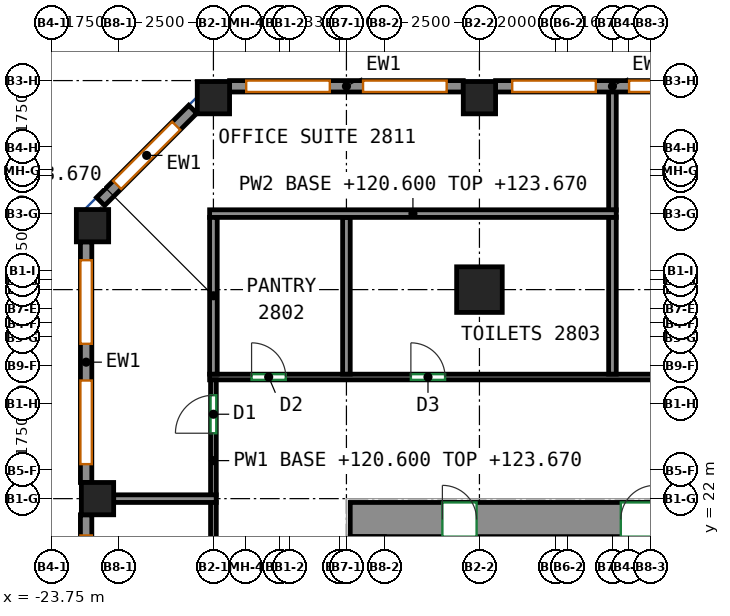
"""IFC4 building model, lengths in metres.
Left out: names, types, materials, properties, quantities, classifications, styles, units other than length and angle.
Written with IfcOpenShell. Run it as: python <this file> out.ifc"""

import sys

from ifc_helpers import new_model, si_unit, direction, frame, frame_2d, origin, origin_2d, place, context, subcontext, project, spatial, rectangle, extrude, source, transform, mapped, element, fill, save


model = new_model("IFC4")
c1 = context("Model", 3, precision=1e-05, world=origin(), true_north=direction((0.0, 1.0)))
c2 = subcontext(c1, "Body", "Model", "MODEL_VIEW")
j1 = project(units=[si_unit("LENGTHUNIT", "METRE"), si_unit("PLANEANGLEUNIT", "RADIAN")], contexts=[c1])
p1 = place(None, origin())
s1 = spatial("IfcSite", under=j1, at=p1, CompositionType="ELEMENT")
p2 = place(p1, origin())
s2 = spatial("IfcBuilding", under=s1, at=p2, CompositionType="ELEMENT")
p3 = place(p2, frame((0.0, 0.0, 120.6)))
s3 = spatial("IfcBuildingStorey", under=s2, at=p3, CompositionType="ELEMENT", Elevation=120.6)
m1 = source(origin(), c2, "Body", "SweptSolid", [
    extrude(rectangle(XDim=0.85, YDim=0.85, at=origin_2d()), origin(), (0.0, 0.0, 1.0), 3.72),
])
for number, where, z_axis, x_axis in (
    (1, (-22.682, 29.182, 0.0), (0.0, 0.0, 1.0), (1.0, 0.0, 0.0)),
    (2, (-22.55, 22.0, 0.0), (0.0, 0.0, 1.0), (1.0, 0.0, 0.0)),
    (3, (-19.5, 32.55, 0.0), (0.0, 0.0, 1.0), (1.0, 0.0, 0.0)),
):
    element("IfcColumn", number, at=place(p3, frame(where, z_axis=z_axis, x_axis=x_axis)), inside=s3, PredefinedType="COLUMN", context=c2, shape_type="MappedRepresentation", body=[
        mapped(m1, transform((0.0, 0.0, 0.0))),
    ])
m2 = source(origin(), c2, "Body", "SweptSolid", [
    extrude(rectangle(XDim=1.2, YDim=1.2, at=origin_2d()), origin(), (0.0, 0.0, 1.0), 3.72),
])
p4 = place(p3, frame((-12.5, 27.5, 0.0), z_axis=(0.0, 0.0, 1.0), x_axis=(1.0, 0.0, 0.0)))
e4 = element("IfcColumn", 4, at=p4, inside=s3, PredefinedType="COLUMN", context=c2, shape_type="MappedRepresentation", body=[
    mapped(m2, transform((0.0, 0.0, 0.0))),
])
p5 = place(p3, frame((-12.5, 32.55, 0.0), z_axis=(0.0, 0.0, 1.0), x_axis=(1.0, 0.0, 0.0)))
e5 = element("IfcColumn", 5, at=p5, inside=s3, PredefinedType="COLUMN", context=c2, shape_type="MappedRepresentation", body=[
    mapped(m1, transform((0.0, 0.0, 0.0))),
])
m3 = source(origin(), c2, "Body", "SweptSolid", [
    extrude(rectangle(XDim=33.9, YDim=0.9, at=frame_2d((16.95, 0.0))), origin(), (0.0, 0.0, 1.0), 3.72),
])
p6 = place(p3, frame((-15.9, 21.45, 0.0), z_axis=(0.0, 0.0, 1.0), x_axis=(1.0, 0.0, 0.0)))
e6 = element("IfcWall", 6, at=p6, inside=s3, PredefinedType="SHEAR", context=c2, shape_type="MappedRepresentation", body=[
    mapped(m3, transform((0.0, 0.0, 0.0))),
])
p7 = place(p6, frame((7.12, 0.0, 0.0)))
e7 = element("IfcOpeningElement", 7, at=p7, cuts=e6, PredefinedType="OPENING", context=c2, shape_type="SweptSolid", body=[
    extrude(rectangle(XDim=0.9, YDim=2.1, at=frame_2d((0.45, 1.05))), frame((0.0, 0.46, 0.0), z_axis=(0.0, -1.0, 0.0), x_axis=(1.0, 0.0, 0.0)), (0.0, 0.0, 1.0), 0.92),
])
p8 = place(p6, frame((12.427, 0.0, 0.0)))
e8 = element("IfcOpeningElement", 8, at=p8, cuts=e6, PredefinedType="OPENING", context=c2, shape_type="SweptSolid", body=[
    extrude(rectangle(XDim=0.9, YDim=2.1, at=frame_2d((0.45, 1.05))), frame((0.0, 0.46, 0.0), z_axis=(0.0, -1.0, 0.0), x_axis=(1.0, 0.0, 0.0)), (0.0, 0.0, 1.0), 0.92),
])
p9 = place(p6, frame((17.465, 0.0, 0.0)))
e9 = element("IfcOpeningElement", 9, at=p9, cuts=e6, PredefinedType="OPENING", context=c2, shape_type="SweptSolid", body=[
    extrude(rectangle(XDim=0.9, YDim=2.1, at=frame_2d((0.45, 1.05))), frame((0.0, 0.46, 0.0), z_axis=(0.0, -1.0, 0.0), x_axis=(1.0, 0.0, 0.0)), (0.0, 0.0, 1.0), 0.92),
])
p10 = place(p6, frame((21.686, 0.0, 0.0)))
e10 = element("IfcOpeningElement", 10, at=p10, cuts=e6, PredefinedType="OPENING", context=c2, shape_type="SweptSolid", body=[
    extrude(rectangle(XDim=0.9, YDim=2.1, at=frame_2d((0.45, 1.05))), frame((0.0, 0.46, 0.0), z_axis=(0.0, -1.0, 0.0), x_axis=(1.0, 0.0, 0.0)), (0.0, 0.0, 1.0), 0.92),
])
p11 = place(p6, frame((26.027, 0.0, 0.0)))
e11 = element("IfcOpeningElement", 11, at=p11, cuts=e6, PredefinedType="OPENING", context=c2, shape_type="SweptSolid", body=[
    extrude(rectangle(XDim=0.9, YDim=2.1, at=frame_2d((0.45, 1.05))), frame((0.0, 0.46, 0.0), z_axis=(0.0, -1.0, 0.0), x_axis=(1.0, 0.0, 0.0)), (0.0, 0.0, 1.0), 0.92),
])
p12 = place(p6, frame((2.425, 0.0, 0.0)))
e12 = element("IfcOpeningElement", 12, at=p12, cuts=e6, PredefinedType="OPENING", context=c2, shape_type="SweptSolid", body=[
    extrude(rectangle(XDim=0.9, YDim=2.1, at=frame_2d((0.45, 1.05))), frame((0.0, 0.46, 0.0), z_axis=(0.0, -1.0, 0.0), x_axis=(1.0, 0.0, 0.0)), (0.0, 0.0, 1.0), 0.92),
])
p13 = place(p6, frame((30.575, 0.0, 0.0)))
e13 = element("IfcOpeningElement", 13, at=p13, cuts=e6, PredefinedType="OPENING", context=c2, shape_type="SweptSolid", body=[
    extrude(rectangle(XDim=0.9, YDim=2.1, at=frame_2d((0.45, 1.05))), frame((0.0, 0.46, 0.0), z_axis=(0.0, -1.0, 0.0), x_axis=(1.0, 0.0, 0.0)), (0.0, 0.0, 1.0), 0.92),
])
m4 = source(origin(), c2, "Body", "SweptSolid", [
    extrude(rectangle(XDim=6.15, YDim=0.3, at=frame_2d((3.075, 0.0))), origin(), (0.0, 0.0, 1.0), 3.72),
])
p14 = place(p3, frame((-5.925, 32.85, 0.0), z_axis=(0.0, 0.0, 1.0), x_axis=(-1.0, 0.0, 0.0)))
e14 = element("IfcWall", 14, at=p14, inside=s3, PredefinedType="SOLIDWALL", context=c2, shape_type="MappedRepresentation", body=[
    mapped(m4, transform((0.0, 0.0, 0.0))),
])
p15 = place(p14, frame((0.438, 0.0, 0.7)))
e15 = element("IfcOpeningElement", 15, at=p15, cuts=e14, PredefinedType="OPENING", context=c2, shape_type="SweptSolid", body=[
    extrude(rectangle(XDim=2.2, YDim=2.25, at=frame_2d((1.1, 1.125))), frame((0.0, 0.16, 0.0), z_axis=(0.0, -1.0, 0.0), x_axis=(1.0, 0.0, 0.0)), (0.0, 0.0, 1.0), 0.32),
])
p16 = place(p14, frame((3.512, 0.0, 0.7)))
e16 = element("IfcOpeningElement", 16, at=p16, cuts=e14, PredefinedType="OPENING", context=c2, shape_type="SweptSolid", body=[
    extrude(rectangle(XDim=2.2, YDim=2.25, at=frame_2d((1.1, 1.125))), frame((0.0, 0.16, 0.0), z_axis=(0.0, -1.0, 0.0), x_axis=(1.0, 0.0, 0.0)), (0.0, 0.0, 1.0), 0.32),
])
p17 = place(p3, frame((-12.925, 32.85, 0.0), z_axis=(0.0, 0.0, 1.0), x_axis=(-1.0, 0.0, 0.0)))
e17 = element("IfcWall", 17, at=p17, inside=s3, PredefinedType="SOLIDWALL", context=c2, shape_type="MappedRepresentation", body=[
    mapped(m4, transform((0.0, 0.0, 0.0))),
])
p18 = place(p17, frame((0.438, 0.0, 0.7)))
e18 = element("IfcOpeningElement", 18, at=p18, cuts=e17, PredefinedType="OPENING", context=c2, shape_type="SweptSolid", body=[
    extrude(rectangle(XDim=2.2, YDim=2.25, at=frame_2d((1.1, 1.125))), frame((0.0, 0.16, 0.0), z_axis=(0.0, -1.0, 0.0), x_axis=(1.0, 0.0, 0.0)), (0.0, 0.0, 1.0), 0.32),
])
p19 = place(p17, frame((3.512, 0.0, 0.7)))
e19 = element("IfcOpeningElement", 19, at=p19, cuts=e17, PredefinedType="OPENING", context=c2, shape_type="SweptSolid", body=[
    extrude(rectangle(XDim=2.2, YDim=2.25, at=frame_2d((1.1, 1.125))), frame((0.0, 0.16, 0.0), z_axis=(0.0, -1.0, 0.0), x_axis=(1.0, 0.0, 0.0)), (0.0, 0.0, 1.0), 0.32),
])
m5 = source(origin(), c2, "Body", "SweptSolid", [
    extrude(rectangle(XDim=3.429, YDim=0.3, at=frame_2d((1.715, 0.0))), origin(), (0.0, 0.0, 1.0), 3.72),
])
p20 = place(p3, frame((-20.044, 32.244, 0.0), z_axis=(0.0, 0.0, 1.0), x_axis=(-0.707106781187, -0.707106781187, 0.0)))
e20 = element("IfcWall", 20, at=p20, inside=s3, PredefinedType="SOLIDWALL", context=c2, shape_type="MappedRepresentation", body=[
    mapped(m5, transform((0.0, 0.0, 0.0))),
])
p21 = place(p20, frame((0.615, 0.0, 0.7)))
e21 = element("IfcOpeningElement", 21, at=p21, cuts=e20, PredefinedType="OPENING", context=c2, shape_type="SweptSolid", body=[
    extrude(rectangle(XDim=2.2, YDim=2.25, at=frame_2d((1.1, 1.125))), frame((0.0, 0.16, 0.0), z_axis=(0.0, -1.0, 0.0), x_axis=(1.0, 0.0, 0.0)), (0.0, 0.0, 1.0), 0.32),
])
m6 = source(origin(), c2, "Body", "SweptSolid", [
    extrude(rectangle(XDim=6.332, YDim=0.3, at=frame_2d((3.166, 0.0))), origin(), (0.0, 0.0, 1.0), 3.72),
])
p22 = place(p3, frame((-22.85, 28.757, 0.0), z_axis=(0.0, 0.0, 1.0), x_axis=(0.0, -1.0, 0.0)))
e22 = element("IfcWall", 22, at=p22, inside=s3, PredefinedType="SOLIDWALL", context=c2, shape_type="MappedRepresentation", body=[
    mapped(m6, transform((0.0, 0.0, 0.0))),
])
p23 = place(p22, frame((0.483, 0.0, 0.7)))
e23 = element("IfcOpeningElement", 23, at=p23, cuts=e22, PredefinedType="OPENING", context=c2, shape_type="SweptSolid", body=[
    extrude(rectangle(XDim=2.2, YDim=2.25, at=frame_2d((1.1, 1.125))), frame((0.0, 0.16, 0.0), z_axis=(0.0, -1.0, 0.0), x_axis=(1.0, 0.0, 0.0)), (0.0, 0.0, 1.0), 0.32),
])
p24 = place(p22, frame((3.649, 0.0, 0.7)))
e24 = element("IfcOpeningElement", 24, at=p24, cuts=e22, PredefinedType="OPENING", context=c2, shape_type="SweptSolid", body=[
    extrude(rectangle(XDim=2.2, YDim=2.25, at=frame_2d((1.1, 1.125))), frame((0.0, 0.16, 0.0), z_axis=(0.0, -1.0, 0.0), x_axis=(1.0, 0.0, 0.0)), (0.0, 0.0, 1.0), 0.32),
])
m7 = source(origin(), c2, "Body", "SweptSolid", [
    extrude(rectangle(XDim=13.15, YDim=0.3, at=frame_2d((6.575, 0.0))), origin(), (0.0, 0.0, 1.0), 3.72),
])
p25 = place(p3, frame((-22.85, 21.575, 0.0), z_axis=(0.0, 0.0, 1.0), x_axis=(0.0, -1.0, 0.0)))
e25 = element("IfcWall", 25, at=p25, inside=s3, PredefinedType="SOLIDWALL", context=c2, shape_type="MappedRepresentation", body=[
    mapped(m7, transform((0.0, 0.0, 0.0))),
])
p26 = place(p25, frame((0.544, 0.0, 0.7)))
e26 = element("IfcOpeningElement", 26, at=p26, cuts=e25, PredefinedType="OPENING", context=c2, shape_type="SweptSolid", body=[
    extrude(rectangle(XDim=2.2, YDim=2.25, at=frame_2d((1.1, 1.125))), frame((0.0, 0.16, 0.0), z_axis=(0.0, -1.0, 0.0), x_axis=(1.0, 0.0, 0.0)), (0.0, 0.0, 1.0), 0.32),
])
p27 = place(p25, frame((3.831, 0.0, 0.7)))
e27 = element("IfcOpeningElement", 27, at=p27, cuts=e25, PredefinedType="OPENING", context=c2, shape_type="SweptSolid", body=[
    extrude(rectangle(XDim=2.2, YDim=2.25, at=frame_2d((1.1, 1.125))), frame((0.0, 0.16, 0.0), z_axis=(0.0, -1.0, 0.0), x_axis=(1.0, 0.0, 0.0)), (0.0, 0.0, 1.0), 0.32),
])
p28 = place(p25, frame((7.119, 0.0, 0.7)))
e28 = element("IfcOpeningElement", 28, at=p28, cuts=e25, PredefinedType="OPENING", context=c2, shape_type="SweptSolid", body=[
    extrude(rectangle(XDim=2.2, YDim=2.25, at=frame_2d((1.1, 1.125))), frame((0.0, 0.16, 0.0), z_axis=(0.0, -1.0, 0.0), x_axis=(1.0, 0.0, 0.0)), (0.0, 0.0, 1.0), 0.32),
])
p29 = place(p25, frame((10.406, 0.0, 0.7)))
e29 = element("IfcOpeningElement", 29, at=p29, cuts=e25, PredefinedType="OPENING", context=c2, shape_type="SweptSolid", body=[
    extrude(rectangle(XDim=2.2, YDim=2.25, at=frame_2d((1.1, 1.125))), frame((0.0, 0.16, 0.0), z_axis=(0.0, -1.0, 0.0), x_axis=(1.0, 0.0, 0.0)), (0.0, 0.0, 1.0), 0.32),
])
p30 = place(p3, frame((-19.6, 25.2, 0.0), z_axis=(0.0, 0.0, 1.0), x_axis=(1.0, 0.0, 0.0)))
e30 = element("IfcWall", 30, at=p30, inside=s3, PredefinedType="PARTITIONING", context=c2, shape_type="SweptSolid", body=[
    extrude(rectangle(XDim=40.175, YDim=0.15, at=frame_2d((20.087, 0.0))), origin(), (0.0, 0.0, 1.0), 3.72),
])
p31 = place(p30, frame((1.104, 0.0, 0.0)))
e31 = element("IfcOpeningElement", 31, at=p31, cuts=e30, PredefinedType="OPENING", context=c2, shape_type="SweptSolid", body=[
    extrude(rectangle(XDim=0.9, YDim=2.1, at=frame_2d((0.45, 1.05))), frame((0.0, 0.085, 0.0), z_axis=(0.0, -1.0, 0.0), x_axis=(1.0, 0.0, 0.0)), (0.0, 0.0, 1.0), 0.17),
])
p32 = place(p30, frame((5.296, 0.0, 0.0)))
e32 = element("IfcOpeningElement", 32, at=p32, cuts=e30, PredefinedType="OPENING", context=c2, shape_type="SweptSolid", body=[
    extrude(rectangle(XDim=0.9, YDim=2.1, at=frame_2d((0.45, 1.05))), frame((0.0, 0.085, 0.0), z_axis=(0.0, -1.0, 0.0), x_axis=(1.0, 0.0, 0.0)), (0.0, 0.0, 1.0), 0.17),
])
p33 = place(p30, frame((18.302, 0.0, 0.0)))
e33 = element("IfcOpeningElement", 33, at=p33, cuts=e30, PredefinedType="OPENING", context=c2, shape_type="SweptSolid", body=[
    extrude(rectangle(XDim=1.0, YDim=2.1, at=frame_2d((0.5, 1.05))), frame((0.0, 0.085, 0.0), z_axis=(0.0, -1.0, 0.0), x_axis=(1.0, 0.0, 0.0)), (0.0, 0.0, 1.0), 0.17),
])
p34 = place(p30, frame((30.209, 0.0, 0.0)))
e34 = element("IfcOpeningElement", 34, at=p34, cuts=e30, PredefinedType="OPENING", context=c2, shape_type="SweptSolid", body=[
    extrude(rectangle(XDim=0.9, YDim=2.1, at=frame_2d((0.45, 1.05))), frame((0.0, 0.085, 0.0), z_axis=(0.0, -1.0, 0.0), x_axis=(1.0, 0.0, 0.0)), (0.0, 0.0, 1.0), 0.17),
])
p35 = place(p30, frame((32.702, 0.0, 0.0)))
e35 = element("IfcOpeningElement", 35, at=p35, cuts=e30, PredefinedType="OPENING", context=c2, shape_type="SweptSolid", body=[
    extrude(rectangle(XDim=1.8, YDim=2.1, at=frame_2d((0.9, 1.05))), frame((0.0, 0.085, 0.0), z_axis=(0.0, -1.0, 0.0), x_axis=(1.0, 0.0, 0.0)), (0.0, 0.0, 1.0), 0.17),
])
p36 = place(p3, frame((-19.5, 22.09, 0.0), z_axis=(0.0, 0.0, 1.0), x_axis=(0.0, 1.0, 0.0)))
e36 = element("IfcWall", 36, at=p36, inside=s3, PredefinedType="PARTITIONING", context=c2, shape_type="SweptSolid", body=[
    extrude(rectangle(XDim=3.035, YDim=0.15, at=frame_2d((1.518, 0.0))), origin(), (0.0, 0.0, 1.0), 3.07),
])
p37 = place(p36, frame((1.631, 0.0, 0.0)))
e37 = element("IfcOpeningElement", 37, at=p37, cuts=e36, PredefinedType="OPENING", context=c2, shape_type="SweptSolid", body=[
    extrude(rectangle(XDim=1.0, YDim=2.1, at=frame_2d((0.5, 1.05))), frame((0.0, 0.085, 0.0), z_axis=(0.0, -1.0, 0.0), x_axis=(1.0, 0.0, 0.0)), (0.0, 0.0, 1.0), 0.17),
])
p38 = place(p3, frame((-19.5, 8.09, 0.0), z_axis=(0.0, 0.0, 1.0), x_axis=(0.0, 1.0, 0.0)))
e38 = element("IfcWall", 38, at=p38, inside=s3, PredefinedType="PARTITIONING", context=c2, shape_type="SweptSolid", body=[
    extrude(rectangle(XDim=13.82, YDim=0.15, at=frame_2d((6.91, 0.0))), origin(), (0.0, 0.0, 1.0), 3.07),
])
p39 = place(p38, frame((9.214, 0.0, 0.0)))
e39 = element("IfcOpeningElement", 39, at=p39, cuts=e38, PredefinedType="OPENING", context=c2, shape_type="SweptSolid", body=[
    extrude(rectangle(XDim=0.9, YDim=2.1, at=frame_2d((0.45, 1.05))), frame((0.0, 0.085, 0.0), z_axis=(0.0, -1.0, 0.0), x_axis=(1.0, 0.0, 0.0)), (0.0, 0.0, 1.0), 0.17),
])
p40 = place(p3, frame((-9.0, 25.276, 0.0), z_axis=(0.0, 0.0, 1.0), x_axis=(0.0, 1.0, 0.0)))
e40 = element("IfcWall", 40, at=p40, inside=s3, PredefinedType="PARTITIONING", context=c2, shape_type="SweptSolid", body=[
    extrude(rectangle(XDim=4.134, YDim=0.2, at=frame_2d((2.067, 0.0))), origin(), (0.0, 0.0, 1.0), 3.72),
])
p41 = place(p3, frame((-9.0, 29.59, 0.0), z_axis=(0.0, 0.0, 1.0), x_axis=(0.0, 1.0, 0.0)))
e41 = element("IfcWall", 41, at=p41, inside=s3, PredefinedType="PARTITIONING", context=c2, shape_type="SweptSolid", body=[
    extrude(rectangle(XDim=3.16, YDim=0.2, at=frame_2d((1.58, 0.0))), origin(), (0.0, 0.0, 1.0), 3.72),
])
p42 = place(p3, frame((-16.0, 29.4, 0.0), z_axis=(0.0, 0.0, 1.0), x_axis=(0.0, -1.0, 0.0)))
e42 = element("IfcWall", 42, at=p42, inside=s3, PredefinedType="PARTITIONING", context=c2, shape_type="SweptSolid", body=[
    extrude(rectangle(XDim=4.124, YDim=0.2, at=frame_2d((2.062, 0.0))), origin(), (0.0, 0.0, 1.0), 3.72),
])
p43 = place(p3, frame((-19.6, 29.5, 0.0), z_axis=(0.0, 0.0, 1.0), x_axis=(1.0, 0.0, 0.0)))
e43 = element("IfcWall", 43, at=p43, inside=s3, PredefinedType="PARTITIONING", context=c2, shape_type="SweptSolid", body=[
    extrude(rectangle(XDim=10.7, YDim=0.2, at=frame_2d((5.35, 0.0))), origin(), (0.0, 0.0, 1.0), 3.07),
])
p44 = place(p3, frame((-19.5, 29.4, 0.0), z_axis=(0.0, 0.0, 1.0), x_axis=(0.0, -1.0, 0.0)))
e44 = element("IfcWall", 44, at=p44, inside=s3, PredefinedType="PARTITIONING", context=c2, shape_type="SweptSolid", body=[
    extrude(rectangle(XDim=4.124, YDim=0.2, at=frame_2d((2.062, 0.0))), origin(), (0.0, 0.0, 1.0), 3.07),
])
p45 = place(p3, frame((-22.125, 22.0, 0.0), z_axis=(0.0, 0.0, 1.0), x_axis=(1.0, 0.0, 0.0)))
e45 = element("IfcWall", 45, at=p45, inside=s3, PredefinedType="PARTITIONING", context=c2, shape_type="SweptSolid", body=[
    extrude(rectangle(XDim=2.699, YDim=0.2, at=frame_2d((1.35, 0.0))), origin(), (0.0, 0.0, 1.0), 3.72),
])
p46 = place(p15, origin())
e46 = element("IfcWindow", 46, at=p46, inside=s3, PartitioningType="SINGLE_PANEL", PredefinedType="WINDOW", context=c2, shape_type="SweptSolid", body=[
    extrude(rectangle(XDim=2.2, YDim=2.25, at=frame_2d((1.1, 1.125))), frame((0.0, 0.03, 0.0), z_axis=(0.0, -1.0, 0.0), x_axis=(1.0, 0.0, 0.0)), (0.0, 0.0, 1.0), 0.06),
])
fill(e15, e46)
p47 = place(p16, origin())
e47 = element("IfcWindow", 47, at=p47, inside=s3, PartitioningType="SINGLE_PANEL", PredefinedType="WINDOW", context=c2, shape_type="SweptSolid", body=[
    extrude(rectangle(XDim=2.2, YDim=2.25, at=frame_2d((1.1, 1.125))), frame((0.0, 0.03, 0.0), z_axis=(0.0, -1.0, 0.0), x_axis=(1.0, 0.0, 0.0)), (0.0, 0.0, 1.0), 0.06),
])
fill(e16, e47)
p48 = place(p18, origin())
e48 = element("IfcWindow", 48, at=p48, inside=s3, PartitioningType="SINGLE_PANEL", PredefinedType="WINDOW", context=c2, shape_type="SweptSolid", body=[
    extrude(rectangle(XDim=2.2, YDim=2.25, at=frame_2d((1.1, 1.125))), frame((0.0, 0.03, 0.0), z_axis=(0.0, -1.0, 0.0), x_axis=(1.0, 0.0, 0.0)), (0.0, 0.0, 1.0), 0.06),
])
fill(e18, e48)
p49 = place(p19, origin())
e49 = element("IfcWindow", 49, at=p49, inside=s3, PartitioningType="SINGLE_PANEL", PredefinedType="WINDOW", context=c2, shape_type="SweptSolid", body=[
    extrude(rectangle(XDim=2.2, YDim=2.25, at=frame_2d((1.1, 1.125))), frame((0.0, 0.03, 0.0), z_axis=(0.0, -1.0, 0.0), x_axis=(1.0, 0.0, 0.0)), (0.0, 0.0, 1.0), 0.06),
])
fill(e19, e49)
p50 = place(p21, origin())
e50 = element("IfcWindow", 50, at=p50, inside=s3, PartitioningType="SINGLE_PANEL", PredefinedType="WINDOW", context=c2, shape_type="SweptSolid", body=[
    extrude(rectangle(XDim=2.2, YDim=2.25, at=frame_2d((1.1, 1.125))), frame((0.0, 0.03, 0.0), z_axis=(0.0, -1.0, 0.0), x_axis=(1.0, 0.0, 0.0)), (0.0, 0.0, 1.0), 0.06),
])
fill(e21, e50)
p51 = place(p23, origin())
e51 = element("IfcWindow", 51, at=p51, inside=s3, PartitioningType="SINGLE_PANEL", PredefinedType="WINDOW", context=c2, shape_type="SweptSolid", body=[
    extrude(rectangle(XDim=2.2, YDim=2.25, at=frame_2d((1.1, 1.125))), frame((0.0, 0.03, 0.0), z_axis=(0.0, -1.0, 0.0), x_axis=(1.0, 0.0, 0.0)), (0.0, 0.0, 1.0), 0.06),
])
fill(e23, e51)
p52 = place(p24, origin())
e52 = element("IfcWindow", 52, at=p52, inside=s3, PartitioningType="SINGLE_PANEL", PredefinedType="WINDOW", context=c2, shape_type="SweptSolid", body=[
    extrude(rectangle(XDim=2.2, YDim=2.25, at=frame_2d((1.1, 1.125))), frame((0.0, 0.03, 0.0), z_axis=(0.0, -1.0, 0.0), x_axis=(1.0, 0.0, 0.0)), (0.0, 0.0, 1.0), 0.06),
])
fill(e24, e52)
p53 = place(p26, origin())
e53 = element("IfcWindow", 53, at=p53, inside=s3, PartitioningType="SINGLE_PANEL", PredefinedType="WINDOW", context=c2, shape_type="SweptSolid", body=[
    extrude(rectangle(XDim=2.2, YDim=2.25, at=frame_2d((1.1, 1.125))), frame((0.0, 0.03, 0.0), z_axis=(0.0, -1.0, 0.0), x_axis=(1.0, 0.0, 0.0)), (0.0, 0.0, 1.0), 0.06),
])
fill(e26, e53)
p54 = place(p7, origin())
e54 = element("IfcDoor", 54, at=p54, inside=s3, OperationType="SINGLE_SWING_RIGHT", PredefinedType="DOOR", context=c2, shape_type="SweptSolid", body=[
    extrude(rectangle(XDim=0.9, YDim=2.1, at=frame_2d((0.45, 1.05))), frame((0.0, -0.305, 0.0), z_axis=(0.0, -1.0, 0.0), x_axis=(1.0, 0.0, 0.0)), (0.0, 0.0, 1.0), 0.05),
])
fill(e7, e54)
p55 = place(p12, origin())
e55 = element("IfcDoor", 55, at=p55, inside=s3, OperationType="SINGLE_SWING_LEFT", PredefinedType="DOOR", context=c2, shape_type="SweptSolid", body=[
    extrude(rectangle(XDim=0.9, YDim=2.1, at=frame_2d((0.45, 1.05))), frame((0.0, -0.305, 0.0), z_axis=(0.0, -1.0, 0.0), x_axis=(1.0, 0.0, 0.0)), (0.0, 0.0, 1.0), 0.05),
])
fill(e12, e55)
p56 = place(p37, origin())
e56 = element("IfcDoor", 56, at=p56, inside=s3, OperationType="SINGLE_SWING_LEFT", PredefinedType="DOOR", context=c2, shape_type="SweptSolid", body=[
    extrude(rectangle(XDim=1.0, YDim=2.1, at=frame_2d((0.5, 1.05))), frame((0.0, 0.025, 0.0), z_axis=(0.0, -1.0, 0.0), x_axis=(1.0, 0.0, 0.0)), (0.0, 0.0, 1.0), 0.05),
])
fill(e37, e56)
p57 = place(p31, origin())
e57 = element("IfcDoor", 57, at=p57, inside=s3, OperationType="SINGLE_SWING_LEFT", PredefinedType="DOOR", context=c2, shape_type="SweptSolid", body=[
    extrude(rectangle(XDim=0.9, YDim=2.1, at=frame_2d((0.45, 1.05))), frame((0.0, 0.025, 0.0), z_axis=(0.0, -1.0, 0.0), x_axis=(1.0, 0.0, 0.0)), (0.0, 0.0, 1.0), 0.05),
])
fill(e31, e57)
p58 = place(p32, origin())
e58 = element("IfcDoor", 58, at=p58, inside=s3, OperationType="SINGLE_SWING_LEFT", PredefinedType="DOOR", context=c2, shape_type="SweptSolid", body=[
    extrude(rectangle(XDim=0.9, YDim=2.1, at=frame_2d((0.45, 1.05))), frame((0.0, 0.025, 0.0), z_axis=(0.0, -1.0, 0.0), x_axis=(1.0, 0.0, 0.0)), (0.0, 0.0, 1.0), 0.05),
])
fill(e32, e58)
save(model, sys.argv[1])
